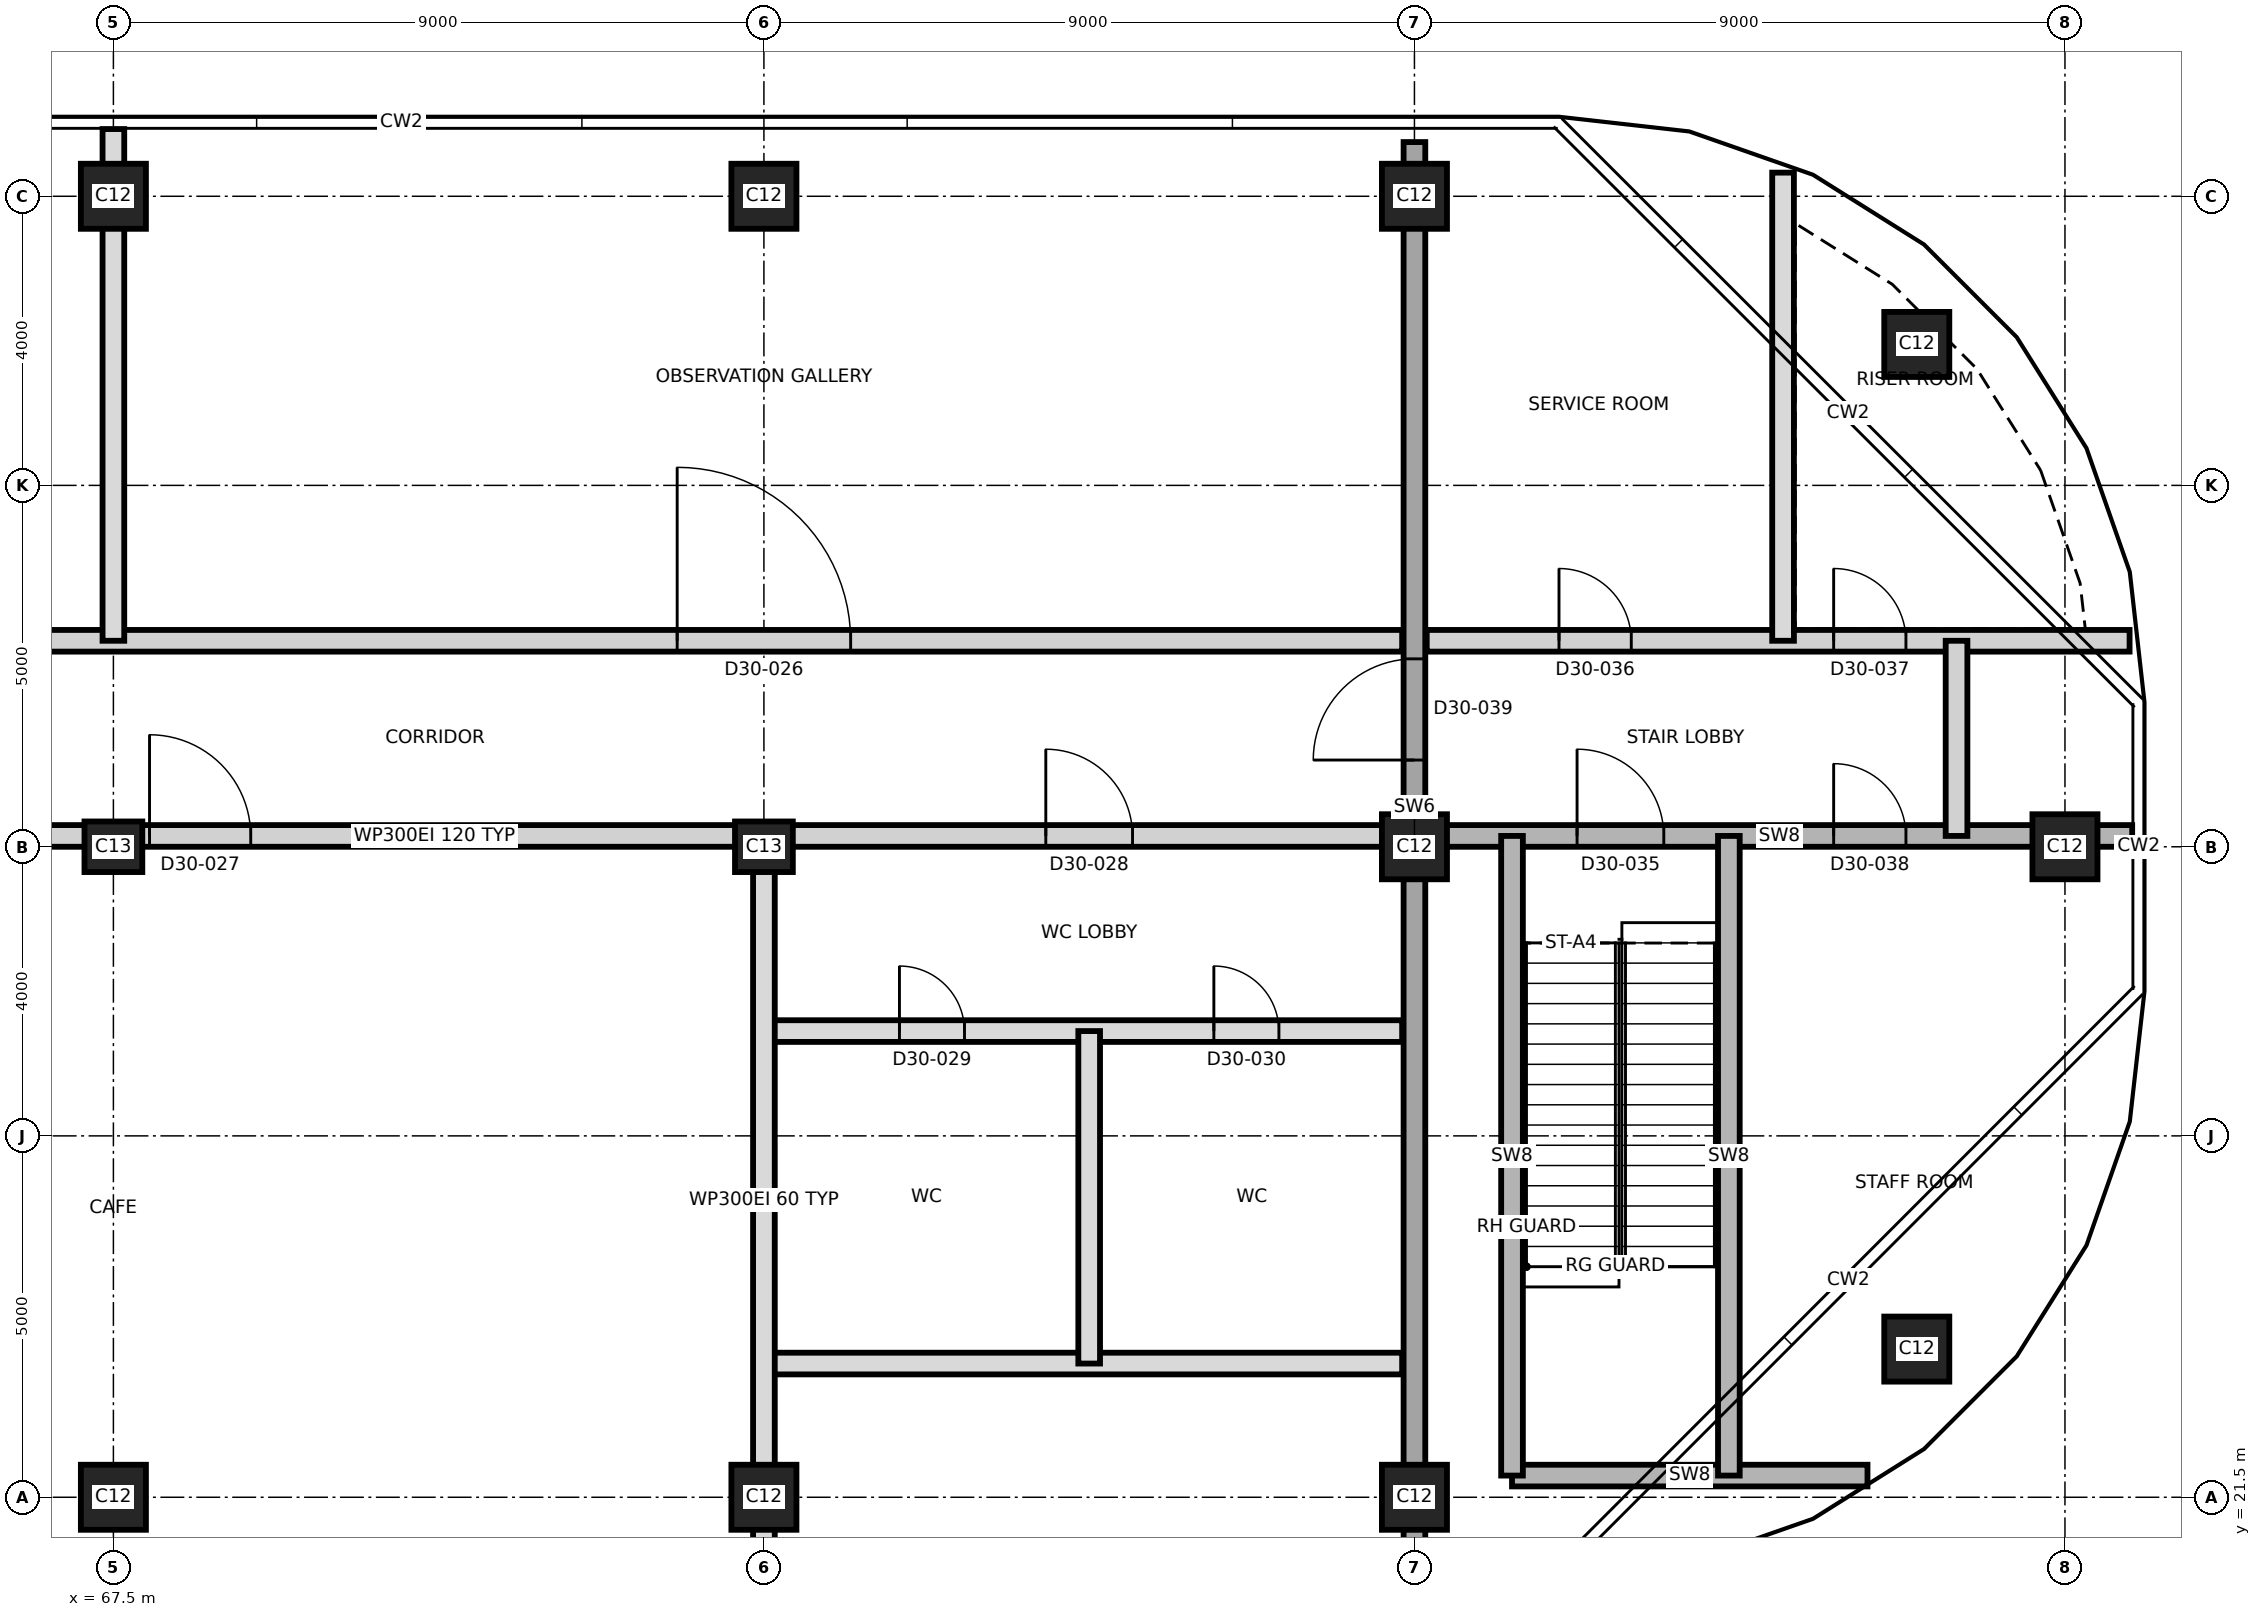
"""IFC4 building model, lengths in metres.
Left out: names, types, materials, properties, quantities, classifications, styles, units other than length and angle.
Written with IfcOpenShell. Run it as: python <this file> out.ifc"""

import sys

from ifc_helpers import new_model, si_unit, direction, frame, frame_2d, origin, origin_2d, place, context, subcontext, project, spatial, rectangle, extrude, element, fill, save


model = new_model("IFC4")
c1 = context("Model", 3, precision=1e-05, world=origin(), true_north=direction((0.0, 1.0)))
c2 = subcontext(c1, "Body", "Model", "MODEL_VIEW")
j1 = project(units=[si_unit("LENGTHUNIT", "METRE"), si_unit("PLANEANGLEUNIT", "RADIAN")], contexts=[c1])
p1 = place(None, origin())
s1 = spatial("IfcSite", under=j1, at=p1, CompositionType="ELEMENT")
p2 = place(p1, origin())
s2 = spatial("IfcBuilding", under=s1, at=p2, CompositionType="ELEMENT")
p3 = place(p2, frame((0.0, 0.0, 260.9)))
s3 = spatial("IfcBuildingStorey", under=s2, at=p3, CompositionType="ELEMENT", Elevation=260.9)
for number, where, z_axis, x_axis in (
    (1, (67.5, 21.5, 0.0), (0.0, 0.0, 1.0), (1.0, 0.0, 0.0)),
    (2, (76.5, 21.5, 0.0), (0.0, 0.0, 1.0), (1.0, 0.0, 0.0)),
    (3, (85.5, 21.5, 0.0), (0.0, 0.0, 1.0), (1.0, 0.0, 0.0)),
    (4, (92.45, 23.55, 0.0), (0.0, 0.0, 1.0), (1.0, 0.0, 0.0)),
):
    element("IfcColumn", number, at=place(p3, frame(where, z_axis=z_axis, x_axis=x_axis)), inside=s3, PredefinedType="COLUMN", context=c2, shape_type="SweptSolid", body=[
        extrude(rectangle(XDim=0.9, YDim=0.9, at=origin_2d()), origin(), (0.0, 0.0, 1.0), 6.0),
    ])
for number, where, z_axis, x_axis in (
    (5, (67.5, 30.5, 0.0), (0.0, 0.0, 1.0), (1.0, 0.0, 0.0)),
    (6, (76.5, 30.5, 0.0), (0.0, 0.0, 1.0), (1.0, 0.0, 0.0)),
):
    element("IfcColumn", number, at=place(p3, frame(where, z_axis=z_axis, x_axis=x_axis)), inside=s3, PredefinedType="COLUMN", context=c2, shape_type="SweptSolid", body=[
        extrude(rectangle(XDim=0.8, YDim=0.7, at=origin_2d()), origin(), (0.0, 0.0, 1.0), 6.0),
    ])
for number, where, z_axis, x_axis in (
    (7, (85.5, 30.5, 0.0), (0.0, 0.0, 1.0), (1.0, 0.0, 0.0)),
    (8, (94.5, 30.5, 0.0), (0.0, 0.0, 1.0), (1.0, 0.0, 0.0)),
    (9, (92.45, 37.45, 0.0), (0.0, 0.0, 1.0), (1.0, 0.0, 0.0)),
    (10, (67.5, 39.5, 0.0), (0.0, 0.0, 1.0), (1.0, 0.0, 0.0)),
    (11, (76.5, 39.5, 0.0), (0.0, 0.0, 1.0), (1.0, 0.0, 0.0)),
    (12, (85.5, 39.5, 0.0), (0.0, 0.0, 1.0), (1.0, 0.0, 0.0)),
):
    element("IfcColumn", number, at=place(p3, frame(where, z_axis=z_axis, x_axis=x_axis)), inside=s3, PredefinedType="COLUMN", context=c2, shape_type="SweptSolid", body=[
        extrude(rectangle(XDim=0.9, YDim=0.9, at=origin_2d()), origin(), (0.0, 0.0, 1.0), 6.0),
    ])
p4 = place(p3, frame((85.5, 20.75, 0.0), z_axis=(0.0, 0.0, 1.0), x_axis=(0.0, 1.0, 0.0)))
e13 = element("IfcWall", 13, at=p4, inside=s3, PredefinedType="SHEAR", context=c2, shape_type="SweptSolid", body=[
    extrude(rectangle(XDim=19.5, YDim=0.3, at=frame_2d((9.75, 0.0))), origin(), (0.0, 0.0, 1.0), 6.0),
])
p5 = place(p4, frame((10.95, 0.0, 0.0)))
e14 = element("IfcOpeningElement", 14, at=p5, cuts=e13, PredefinedType="OPENING", context=c2, shape_type="SweptSolid", body=[
    extrude(rectangle(XDim=1.4, YDim=2.1, at=frame_2d((0.7, 1.05))), frame((0.0, 0.16, 0.0), z_axis=(0.0, -1.0, 0.0), x_axis=(1.0, 0.0, 0.0)), (0.0, 0.0, 1.0), 0.32),
])
p6 = place(p3, frame((86.85, 21.8, 0.0), z_axis=(0.0, 0.0, 1.0), x_axis=(1.0, 0.0, 0.0)))
e15 = element("IfcWall", 15, at=p6, inside=s3, PredefinedType="SHEAR", context=c2, shape_type="SweptSolid", body=[
    extrude(rectangle(XDim=4.918, YDim=0.3, at=frame_2d((2.459, 0.0))), origin(), (0.0, 0.0, 1.0), 5.7),
])
p7 = place(p3, frame((76.5, 23.35, 0.0), z_axis=(0.0, 0.0, 1.0), x_axis=(1.0, 0.0, 0.0)))
e16 = element("IfcWall", 16, at=p7, inside=s3, PredefinedType="PARTITIONING", context=c2, shape_type="SweptSolid", body=[
    extrude(rectangle(XDim=8.83, YDim=0.3, at=frame_2d((4.415, 0.0))), origin(), (0.0, 0.0, 1.0), 5.7),
])
p8 = place(p3, frame((76.5, 27.95, 0.0), z_axis=(0.0, 0.0, 1.0), x_axis=(1.0, 0.0, 0.0)))
e17 = element("IfcWall", 17, at=p8, inside=s3, PredefinedType="PARTITIONING", context=c2, shape_type="SweptSolid", body=[
    extrude(rectangle(XDim=8.83, YDim=0.3, at=frame_2d((4.415, 0.0))), origin(), (0.0, 0.0, 1.0), 5.7),
])
p9 = place(p8, frame((1.875, 0.0, 0.0)))
e18 = element("IfcOpeningElement", 18, at=p9, cuts=e17, PredefinedType="OPENING", context=c2, shape_type="SweptSolid", body=[
    extrude(rectangle(XDim=0.9, YDim=2.1, at=frame_2d((0.45, 1.05))), frame((0.0, 0.16, 0.0), z_axis=(0.0, -1.0, 0.0), x_axis=(1.0, 0.0, 0.0)), (0.0, 0.0, 1.0), 0.32),
])
p10 = place(p8, frame((6.225, 0.0, 0.0)))
e19 = element("IfcOpeningElement", 19, at=p10, cuts=e17, PredefinedType="OPENING", context=c2, shape_type="SweptSolid", body=[
    extrude(rectangle(XDim=0.9, YDim=2.1, at=frame_2d((0.45, 1.05))), frame((0.0, 0.16, 0.0), z_axis=(0.0, -1.0, 0.0), x_axis=(1.0, 0.0, 0.0)), (0.0, 0.0, 1.0), 0.32),
])
p11 = place(p3, frame((58.55, 30.65, 0.0), z_axis=(0.0, 0.0, 1.0), x_axis=(1.0, 0.0, 0.0)))
e20 = element("IfcWall", 20, at=p11, inside=s3, PredefinedType="PARTITIONING", context=c2, shape_type="SweptSolid", body=[
    extrude(rectangle(XDim=26.78, YDim=0.3, at=frame_2d((13.39, 0.0))), origin(), (0.0, 0.0, 1.0), 5.7),
])
p12 = place(p11, frame((9.45, 0.0, 0.0)))
e21 = element("IfcOpeningElement", 21, at=p12, cuts=e20, PredefinedType="OPENING", context=c2, shape_type="SweptSolid", body=[
    extrude(rectangle(XDim=1.4, YDim=2.1, at=frame_2d((0.7, 1.05))), frame((0.0, 0.16, 0.0), z_axis=(0.0, -1.0, 0.0), x_axis=(1.0, 0.0, 0.0)), (0.0, 0.0, 1.0), 0.32),
])
p13 = place(p11, frame((21.85, 0.0, 0.0)))
e22 = element("IfcOpeningElement", 22, at=p13, cuts=e20, PredefinedType="OPENING", context=c2, shape_type="SweptSolid", body=[
    extrude(rectangle(XDim=1.2, YDim=2.1, at=frame_2d((0.6, 1.05))), frame((0.0, 0.16, 0.0), z_axis=(0.0, -1.0, 0.0), x_axis=(1.0, 0.0, 0.0)), (0.0, 0.0, 1.0), 0.32),
])
p14 = place(p3, frame((85.67, 30.65, 0.0), z_axis=(0.0, 0.0, 1.0), x_axis=(1.0, 0.0, 0.0)))
e23 = element("IfcWall", 23, at=p14, inside=s3, PredefinedType="SHEAR", context=c2, shape_type="SweptSolid", body=[
    extrude(rectangle(XDim=9.76, YDim=0.3, at=frame_2d((4.88, 0.0))), origin(), (0.0, 0.0, 1.0), 5.7),
])
p15 = place(p14, frame((2.08, 0.0, 0.0)))
e24 = element("IfcOpeningElement", 24, at=p15, cuts=e23, PredefinedType="OPENING", context=c2, shape_type="SweptSolid", body=[
    extrude(rectangle(XDim=1.2, YDim=2.1, at=frame_2d((0.6, 1.05))), frame((0.0, 0.16, 0.0), z_axis=(0.0, -1.0, 0.0), x_axis=(1.0, 0.0, 0.0)), (0.0, 0.0, 1.0), 0.32),
])
p16 = place(p14, frame((5.63, 0.0, 0.0)))
e25 = element("IfcOpeningElement", 25, at=p16, cuts=e23, PredefinedType="OPENING", context=c2, shape_type="SweptSolid", body=[
    extrude(rectangle(XDim=1.0, YDim=2.1, at=frame_2d((0.5, 1.05))), frame((0.0, 0.16, 0.0), z_axis=(0.0, -1.0, 0.0), x_axis=(1.0, 0.0, 0.0)), (0.0, 0.0, 1.0), 0.32),
])
p17 = place(p3, frame((58.55, 33.35, 0.0), z_axis=(0.0, 0.0, 1.0), x_axis=(1.0, 0.0, 0.0)))
e26 = element("IfcWall", 26, at=p17, inside=s3, PredefinedType="PARTITIONING", context=c2, shape_type="SweptSolid", body=[
    extrude(rectangle(XDim=26.78, YDim=0.3, at=frame_2d((13.39, 0.0))), origin(), (0.0, 0.0, 1.0), 5.7),
])
p18 = place(p17, frame((3.25, 0.0, 0.0)))
e27 = element("IfcOpeningElement", 27, at=p18, cuts=e26, PredefinedType="OPENING", context=c2, shape_type="SweptSolid", body=[
    extrude(rectangle(XDim=2.4, YDim=2.4, at=frame_2d((1.2, 1.2))), frame((0.0, 0.16, 0.0), z_axis=(0.0, -1.0, 0.0), x_axis=(1.0, 0.0, 0.0)), (0.0, 0.0, 1.0), 0.32),
])
p19 = place(p17, frame((16.75, 0.0, 0.0)))
e28 = element("IfcOpeningElement", 28, at=p19, cuts=e26, PredefinedType="OPENING", context=c2, shape_type="SweptSolid", body=[
    extrude(rectangle(XDim=2.4, YDim=2.4, at=frame_2d((1.2, 1.2))), frame((0.0, 0.16, 0.0), z_axis=(0.0, -1.0, 0.0), x_axis=(1.0, 0.0, 0.0)), (0.0, 0.0, 1.0), 0.32),
])
p20 = place(p3, frame((85.67, 33.35, 0.0), z_axis=(0.0, 0.0, 1.0), x_axis=(1.0, 0.0, 0.0)))
e29 = element("IfcWall", 29, at=p20, inside=s3, PredefinedType="PARTITIONING", context=c2, shape_type="SweptSolid", body=[
    extrude(rectangle(XDim=9.724, YDim=0.3, at=frame_2d((4.862, 0.0))), origin(), (0.0, 0.0, 1.0), 5.7),
])
p21 = place(p20, frame((1.83, 0.0, 0.0)))
e30 = element("IfcOpeningElement", 30, at=p21, cuts=e29, PredefinedType="OPENING", context=c2, shape_type="SweptSolid", body=[
    extrude(rectangle(XDim=1.0, YDim=2.1, at=frame_2d((0.5, 1.05))), frame((0.0, 0.16, 0.0), z_axis=(0.0, -1.0, 0.0), x_axis=(1.0, 0.0, 0.0)), (0.0, 0.0, 1.0), 0.32),
])
p22 = place(p20, frame((5.63, 0.0, 0.0)))
e31 = element("IfcOpeningElement", 31, at=p22, cuts=e29, PredefinedType="OPENING", context=c2, shape_type="SweptSolid", body=[
    extrude(rectangle(XDim=1.0, YDim=2.1, at=frame_2d((0.5, 1.05))), frame((0.0, 0.16, 0.0), z_axis=(0.0, -1.0, 0.0), x_axis=(1.0, 0.0, 0.0)), (0.0, 0.0, 1.0), 0.32),
])
p23 = place(p3, frame((67.5, 33.35, 0.0), z_axis=(0.0, 0.0, 1.0), x_axis=(0.0, 1.0, 0.0)))
e32 = element("IfcWall", 32, at=p23, inside=s3, PredefinedType="PARTITIONING", context=c2, shape_type="SweptSolid", body=[
    extrude(rectangle(XDim=7.08, YDim=0.3, at=frame_2d((3.54, 0.0))), origin(), (0.0, 0.0, 1.0), 5.7),
])
p24 = place(p3, frame((76.5, 20.57, 0.0), z_axis=(0.0, 0.0, 1.0), x_axis=(0.0, 1.0, 0.0)))
e33 = element("IfcWall", 33, at=p24, inside=s3, PredefinedType="PARTITIONING", context=c2, shape_type="SweptSolid", body=[
    extrude(rectangle(XDim=10.08, YDim=0.3, at=frame_2d((5.04, 0.0))), origin(), (0.0, 0.0, 1.0), 5.7),
])
p25 = place(p3, frame((81.0, 23.35, 0.0), z_axis=(0.0, 0.0, 1.0), x_axis=(0.0, 1.0, 0.0)))
e34 = element("IfcWall", 34, at=p25, inside=s3, PredefinedType="PARTITIONING", context=c2, shape_type="SweptSolid", body=[
    extrude(rectangle(XDim=4.6, YDim=0.3, at=frame_2d((2.3, 0.0))), origin(), (0.0, 0.0, 1.0), 5.7),
])
for number, where, z_axis, x_axis in (
    (35, (86.85, 21.8, 0.0), (0.0, 0.0, 1.0), (0.0, 1.0, 0.0)),
    (36, (89.85, 21.8, 0.0), (0.0, 0.0, 1.0), (0.0, 1.0, 0.0)),
):
    element("IfcWall", number, at=place(p3, frame(where, z_axis=z_axis, x_axis=x_axis)), inside=s3, PredefinedType="SHEAR", context=c2, shape_type="SweptSolid", body=[
        extrude(rectangle(XDim=8.85, YDim=0.3, at=frame_2d((4.425, 0.0))), origin(), (0.0, 0.0, 1.0), 5.7),
    ])
p26 = place(p3, frame((90.6, 33.35, 0.0), z_axis=(0.0, 0.0, 1.0), x_axis=(0.0, 1.0, 0.0)))
e37 = element("IfcWall", 37, at=p26, inside=s3, PredefinedType="PARTITIONING", context=c2, shape_type="SweptSolid", body=[
    extrude(rectangle(XDim=6.477, YDim=0.3, at=frame_2d((3.238, 0.0))), origin(), (0.0, 0.0, 1.0), 5.7),
])
p27 = place(p3, frame((93.0, 30.65, 0.0), z_axis=(0.0, 0.0, 1.0), x_axis=(0.0, 1.0, 0.0)))
e38 = element("IfcWall", 38, at=p27, inside=s3, PredefinedType="PARTITIONING", context=c2, shape_type="SweptSolid", body=[
    extrude(rectangle(XDim=2.7, YDim=0.3, at=frame_2d((1.35, 0.0))), origin(), (0.0, 0.0, 1.0), 5.7),
])
p28 = place(p19, origin())
e39 = element("IfcDoor", 39, at=p28, inside=s3, OperationType="SINGLE_SWING_LEFT", PredefinedType="DOOR", context=c2, shape_type="SweptSolid", body=[
    extrude(rectangle(XDim=2.4, YDim=2.4, at=frame_2d((1.2, 1.2))), frame((0.0, 0.025, 0.0), z_axis=(0.0, -1.0, 0.0), x_axis=(1.0, 0.0, 0.0)), (0.0, 0.0, 1.0), 0.05),
])
fill(e28, e39)
p29 = place(p12, origin())
e40 = element("IfcDoor", 40, at=p29, inside=s3, OperationType="SINGLE_SWING_LEFT", PredefinedType="DOOR", context=c2, shape_type="SweptSolid", body=[
    extrude(rectangle(XDim=1.4, YDim=2.1, at=frame_2d((0.7, 1.05))), frame((0.0, 0.025, 0.0), z_axis=(0.0, -1.0, 0.0), x_axis=(1.0, 0.0, 0.0)), (0.0, 0.0, 1.0), 0.05),
])
fill(e21, e40)
p30 = place(p13, origin())
e41 = element("IfcDoor", 41, at=p30, inside=s3, OperationType="SINGLE_SWING_LEFT", PredefinedType="DOOR", context=c2, shape_type="SweptSolid", body=[
    extrude(rectangle(XDim=1.2, YDim=2.1, at=frame_2d((0.6, 1.05))), frame((0.0, 0.025, 0.0), z_axis=(0.0, -1.0, 0.0), x_axis=(1.0, 0.0, 0.0)), (0.0, 0.0, 1.0), 0.05),
])
fill(e22, e41)
p31 = place(p9, origin())
e42 = element("IfcDoor", 42, at=p31, inside=s3, OperationType="SINGLE_SWING_LEFT", PredefinedType="DOOR", context=c2, shape_type="SweptSolid", body=[
    extrude(rectangle(XDim=0.9, YDim=2.1, at=frame_2d((0.45, 1.05))), frame((0.0, 0.025, 0.0), z_axis=(0.0, -1.0, 0.0), x_axis=(1.0, 0.0, 0.0)), (0.0, 0.0, 1.0), 0.05),
])
fill(e18, e42)
p32 = place(p10, origin())
e43 = element("IfcDoor", 43, at=p32, inside=s3, OperationType="SINGLE_SWING_RIGHT", PredefinedType="DOOR", context=c2, shape_type="SweptSolid", body=[
    extrude(rectangle(XDim=0.9, YDim=2.1, at=frame_2d((0.45, 1.05))), frame((0.0, 0.025, 0.0), z_axis=(0.0, -1.0, 0.0), x_axis=(1.0, 0.0, 0.0)), (0.0, 0.0, 1.0), 0.05),
])
fill(e19, e43)
p33 = place(p15, origin())
e44 = element("IfcDoor", 44, at=p33, inside=s3, OperationType="SINGLE_SWING_LEFT", PredefinedType="DOOR", context=c2, shape_type="SweptSolid", body=[
    extrude(rectangle(XDim=1.2, YDim=2.1, at=frame_2d((0.6, 1.05))), frame((0.0, 0.025, 0.0), z_axis=(0.0, -1.0, 0.0), x_axis=(1.0, 0.0, 0.0)), (0.0, 0.0, 1.0), 0.05),
])
fill(e24, e44)
p34 = place(p21, origin())
e45 = element("IfcDoor", 45, at=p34, inside=s3, OperationType="SINGLE_SWING_LEFT", PredefinedType="DOOR", context=c2, shape_type="SweptSolid", body=[
    extrude(rectangle(XDim=1.0, YDim=2.1, at=frame_2d((0.5, 1.05))), frame((0.0, 0.025, 0.0), z_axis=(0.0, -1.0, 0.0), x_axis=(1.0, 0.0, 0.0)), (0.0, 0.0, 1.0), 0.05),
])
fill(e30, e45)
p35 = place(p22, origin())
e46 = element("IfcDoor", 46, at=p35, inside=s3, OperationType="SINGLE_SWING_RIGHT", PredefinedType="DOOR", context=c2, shape_type="SweptSolid", body=[
    extrude(rectangle(XDim=1.0, YDim=2.1, at=frame_2d((0.5, 1.05))), frame((0.0, 0.025, 0.0), z_axis=(0.0, -1.0, 0.0), x_axis=(1.0, 0.0, 0.0)), (0.0, 0.0, 1.0), 0.05),
])
fill(e31, e46)
p36 = place(p16, origin())
e47 = element("IfcDoor", 47, at=p36, inside=s3, OperationType="SINGLE_SWING_LEFT", PredefinedType="DOOR", context=c2, shape_type="SweptSolid", body=[
    extrude(rectangle(XDim=1.0, YDim=2.1, at=frame_2d((0.5, 1.05))), frame((0.0, 0.025, 0.0), z_axis=(0.0, -1.0, 0.0), x_axis=(1.0, 0.0, 0.0)), (0.0, 0.0, 1.0), 0.05),
])
fill(e25, e47)
p37 = place(p5, origin())
e48 = element("IfcDoor", 48, at=p37, inside=s3, OperationType="SINGLE_SWING_RIGHT", PredefinedType="DOOR", context=c2, shape_type="SweptSolid", body=[
    extrude(rectangle(XDim=1.4, YDim=2.1, at=frame_2d((0.7, 1.05))), frame((0.0, 0.025, 0.0), z_axis=(0.0, -1.0, 0.0), x_axis=(1.0, 0.0, 0.0)), (0.0, 0.0, 1.0), 0.05),
])
fill(e14, e48)
save(model, sys.argv[1])
